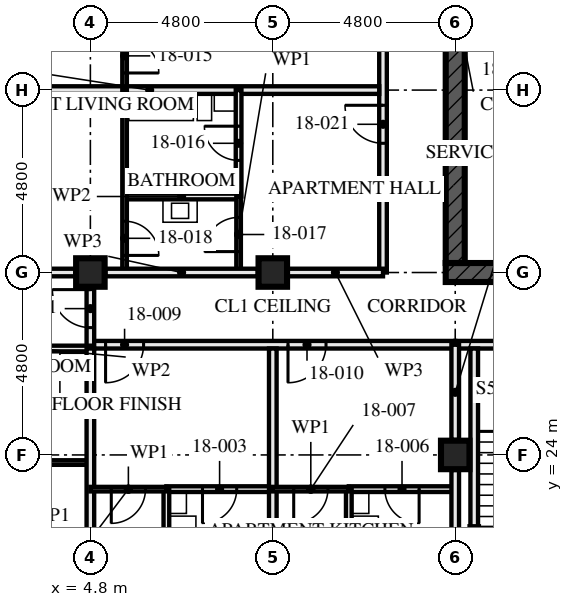
"""IFC4 building model, lengths in metres.
Left out: names, types, materials, properties, quantities, classifications, styles, units other than length and angle.
Written with IfcOpenShell. Run it as: python <this file> out.ifc"""

import sys

from ifc_helpers import new_model, si_unit, direction, frame, frame_2d, origin, origin_2d, place, context, subcontext, project, spatial, rectangle, hollow_rectangle, extrude, element, fill, save


model = new_model("IFC4")
c1 = context("Model", 3, precision=1e-05, world=origin(), true_north=direction((0.0, 1.0)))
c2 = subcontext(c1, "Body", "Model", "MODEL_VIEW")
j1 = project(units=[si_unit("LENGTHUNIT", "METRE"), si_unit("PLANEANGLEUNIT", "RADIAN")], contexts=[c1])
p1 = place(None, origin())
s1 = spatial("IfcSite", under=j1, at=p1, CompositionType="ELEMENT")
p2 = place(p1, origin())
s2 = spatial("IfcBuilding", under=s1, at=p2, CompositionType="ELEMENT")
p3 = place(p2, frame((0.0, 0.0, 69.0)))
s3 = spatial("IfcBuildingStorey", under=s2, at=p3, CompositionType="ELEMENT", Elevation=69.0)
for number, where, z_axis, x_axis in (
    (1, (4.8, 28.8, 0.0), (0.0, 0.0, 1.0), (0.0, 1.0, 0.0)),
    (2, (9.6, 28.8, 0.0), (0.0, 0.0, 1.0), (0.0, 1.0, 0.0)),
    (3, (14.4, 24.0, 0.0), (0.0, 0.0, 1.0), (1.0, 0.0, 0.0)),
):
    element("IfcColumn", number, at=place(p3, frame(where, z_axis=z_axis, x_axis=x_axis)), inside=s3, PredefinedType="COLUMN", context=c2, shape_type="SweptSolid", body=[
        extrude(hollow_rectangle(XDim=0.75, YDim=0.75, WallThickness=0.08, at=origin_2d()), origin(), (0.0, 0.0, 1.0), 3.5),
    ])
p4 = place(p3, frame((14.15, 28.8, -0.17), z_axis=(0.0, 0.0, 1.0), x_axis=(1.0, 0.0, 0.0)))
e4 = element("IfcWall", 4, at=p4, inside=s3, PredefinedType="SHEAR", context=c2, shape_type="SweptSolid", body=[
    extrude(rectangle(XDim=14.9, YDim=0.5, at=frame_2d((7.45, 0.0))), origin(), (0.0, 0.0, 1.0), 3.5),
])
p5 = place(p4, frame((6.85, 0.0, 0.17)))
e5 = element("IfcOpeningElement", 5, at=p5, cuts=e4, PredefinedType="OPENING", context=c2, shape_type="SweptSolid", body=[
    extrude(rectangle(XDim=1.2, YDim=2.1, at=frame_2d((0.6, 1.05))), frame((0.0, 0.26, 0.0), z_axis=(0.0, -1.0, 0.0), x_axis=(1.0, 0.0, 0.0)), (0.0, 0.0, 1.0), 0.521),
])
p6 = place(p3, frame((14.4, 42.95, -0.17), z_axis=(0.0, 0.0, 1.0), x_axis=(0.0, -1.0, 0.0)))
e6 = element("IfcWall", 6, at=p6, inside=s3, PredefinedType="SHEAR", context=c2, shape_type="SweptSolid", body=[
    extrude(rectangle(XDim=13.9, YDim=0.5, at=frame_2d((6.95, 0.0))), origin(), (0.0, 0.0, 1.0), 3.5),
])
p7 = place(p6, frame((6.35, 0.0, 0.17)))
e7 = element("IfcOpeningElement", 7, at=p7, cuts=e6, PredefinedType="OPENING", context=c2, shape_type="SweptSolid", body=[
    extrude(rectangle(XDim=1.2, YDim=2.1, at=frame_2d((0.6, 1.05))), frame((0.0, 0.26, 0.0), z_axis=(0.0, -1.0, 0.0), x_axis=(1.0, 0.0, 0.0)), (0.0, 0.0, 1.0), 0.521),
])
p8 = place(p3, frame((2.0, 26.8, 0.0), z_axis=(0.0, 0.0, 1.0), x_axis=(1.0, 0.0, 0.0)))
e8 = element("IfcWall", 8, at=p8, inside=s3, PredefinedType="PARTITIONING", context=c2, shape_type="SweptSolid", body=[
    extrude(rectangle(XDim=2.8, YDim=0.15, at=frame_2d((1.4, 0.0))), origin(), (0.0, 0.0, 1.0), 3.33),
])
p9 = place(p3, frame((0.32, 23.8, 0.0), z_axis=(0.0, 0.0, 1.0), x_axis=(1.0, 0.0, 0.0)))
e9 = element("IfcWall", 9, at=p9, inside=s3, PredefinedType="PARTITIONING", context=c2, shape_type="SweptSolid", body=[
    extrude(rectangle(XDim=4.48, YDim=0.12, at=frame_2d((2.24, 0.0))), origin(), (0.0, 0.0, 1.0), 3.33),
])
p10 = place(p9, frame((0.605, 0.0, 0.0)))
e10 = element("IfcOpeningElement", 10, at=p10, cuts=e9, PredefinedType="OPENING", context=c2, shape_type="SweptSolid", body=[
    extrude(rectangle(XDim=0.9, YDim=2.1, at=frame_2d((0.45, 1.05))), frame((0.0, 0.071, 0.0), z_axis=(0.0, -1.0, 0.0), x_axis=(1.0, 0.0, 0.0)), (0.0, 0.0, 1.0), 0.141),
])
p11 = place(p3, frame((4.8, 19.52, 0.0), z_axis=(0.0, 0.0, 1.0), x_axis=(0.0, 1.0, 0.0)))
e11 = element("IfcWall", 11, at=p11, inside=s3, PredefinedType="PARTITIONING", context=c2, shape_type="SweptSolid", body=[
    extrude(rectangle(XDim=7.28, YDim=0.2, at=frame_2d((3.64, 0.0))), origin(), (0.0, 0.0, 1.0), 2.55),
])
p12 = place(p3, frame((6.8, 20.1, 0.0), z_axis=(0.0, 0.0, 1.0), x_axis=(0.0, 1.0, 0.0)))
e12 = element("IfcWall", 12, at=p12, inside=s3, PredefinedType="PARTITIONING", context=c2, shape_type="SweptSolid", body=[
    extrude(rectangle(XDim=3.0, YDim=0.15, at=frame_2d((1.5, 0.0))), origin(), (0.0, 0.0, 1.0), 3.33),
])
p13 = place(p3, frame((6.8, 23.1, 0.0), z_axis=(0.0, 0.0, 1.0), x_axis=(1.0, 0.0, 0.0)))
e13 = element("IfcWall", 13, at=p13, inside=s3, PredefinedType="PARTITIONING", context=c2, shape_type="SweptSolid", body=[
    extrude(rectangle(XDim=2.8, YDim=0.15, at=frame_2d((1.4, 0.0))), origin(), (0.0, 0.0, 1.0), 3.33),
])
p14 = place(p13, frame((0.95, 0.0, 0.0)))
e14 = element("IfcOpeningElement", 14, at=p14, cuts=e13, PredefinedType="OPENING", context=c2, shape_type="SweptSolid", body=[
    extrude(rectangle(XDim=0.9, YDim=2.1, at=frame_2d((0.45, 1.05))), frame((0.0, 0.085, 0.0), z_axis=(0.0, -1.0, 0.0), x_axis=(1.0, 0.0, 0.0)), (0.0, 0.0, 1.0), 0.171),
])
p15 = place(p3, frame((4.8, 23.1, 0.0), z_axis=(0.0, 0.0, 1.0), x_axis=(1.0, 0.0, 0.0)))
e15 = element("IfcWall", 15, at=p15, inside=s3, PredefinedType="PARTITIONING", context=c2, shape_type="SweptSolid", body=[
    extrude(rectangle(XDim=2.0, YDim=0.12, at=frame_2d((1.0, 0.0))), origin(), (0.0, 0.0, 1.0), 3.33),
])
p16 = place(p15, frame((0.55, 0.0, 0.0)))
e16 = element("IfcOpeningElement", 16, at=p16, cuts=e15, PredefinedType="OPENING", context=c2, shape_type="SweptSolid", body=[
    extrude(rectangle(XDim=0.9, YDim=2.1, at=frame_2d((0.45, 1.05))), frame((0.0, 0.071, 0.0), z_axis=(0.0, -1.0, 0.0), x_axis=(1.0, 0.0, 0.0)), (0.0, 0.0, 1.0), 0.141),
])
p17 = place(p3, frame((9.6, 14.72, 0.0), z_axis=(0.0, 0.0, 1.0), x_axis=(0.0, 1.0, 0.0)))
e17 = element("IfcWall", 17, at=p17, inside=s3, PredefinedType="PARTITIONING", context=c2, shape_type="SweptSolid", body=[
    extrude(rectangle(XDim=12.08, YDim=0.2, at=frame_2d((6.04, 0.0))), origin(), (0.0, 0.0, 1.0), 2.55),
])
p18 = place(p3, frame((11.6, 20.1, 0.0), z_axis=(0.0, 0.0, 1.0), x_axis=(0.0, 1.0, 0.0)))
e18 = element("IfcWall", 18, at=p18, inside=s3, PredefinedType="PARTITIONING", context=c2, shape_type="SweptSolid", body=[
    extrude(rectangle(XDim=3.0, YDim=0.15, at=frame_2d((1.5, 0.0))), origin(), (0.0, 0.0, 1.0), 3.33),
])
p19 = place(p3, frame((11.6, 23.1, 0.0), z_axis=(0.0, 0.0, 1.0), x_axis=(1.0, 0.0, 0.0)))
e19 = element("IfcWall", 19, at=p19, inside=s3, PredefinedType="PARTITIONING", context=c2, shape_type="SweptSolid", body=[
    extrude(rectangle(XDim=2.8, YDim=0.15, at=frame_2d((1.4, 0.0))), origin(), (0.0, 0.0, 1.0), 3.33),
])
p20 = place(p19, frame((0.95, 0.0, 0.0)))
e20 = element("IfcOpeningElement", 20, at=p20, cuts=e19, PredefinedType="OPENING", context=c2, shape_type="SweptSolid", body=[
    extrude(rectangle(XDim=0.9, YDim=2.1, at=frame_2d((0.45, 1.05))), frame((0.0, 0.085, 0.0), z_axis=(0.0, -1.0, 0.0), x_axis=(1.0, 0.0, 0.0)), (0.0, 0.0, 1.0), 0.171),
])
p21 = place(p3, frame((9.6, 23.1, 0.0), z_axis=(0.0, 0.0, 1.0), x_axis=(1.0, 0.0, 0.0)))
e21 = element("IfcWall", 21, at=p21, inside=s3, PredefinedType="PARTITIONING", context=c2, shape_type="SweptSolid", body=[
    extrude(rectangle(XDim=2.0, YDim=0.12, at=frame_2d((1.0, 0.0))), origin(), (0.0, 0.0, 1.0), 3.33),
])
p22 = place(p21, frame((0.55, 0.0, 0.0)))
e22 = element("IfcOpeningElement", 22, at=p22, cuts=e21, PredefinedType="OPENING", context=c2, shape_type="SweptSolid", body=[
    extrude(rectangle(XDim=0.9, YDim=2.1, at=frame_2d((0.45, 1.05))), frame((0.0, 0.071, 0.0), z_axis=(0.0, -1.0, 0.0), x_axis=(1.0, 0.0, 0.0)), (0.0, 0.0, 1.0), 0.141),
])
p23 = place(p3, frame((4.8, 26.9, 0.0), z_axis=(0.0, 0.0, 1.0), x_axis=(1.0, 0.0, 0.0)))
e23 = element("IfcWall", 23, at=p23, inside=s3, PredefinedType="PARTITIONING", context=c2, shape_type="SweptSolid", body=[
    extrude(rectangle(XDim=9.6, YDim=0.2, at=frame_2d((4.8, 0.0))), origin(), (0.0, 0.0, 1.0), 3.33),
])
p24 = place(p23, frame((0.4, 0.0, 0.0)))
e24 = element("IfcOpeningElement", 24, at=p24, cuts=e23, PredefinedType="OPENING", context=c2, shape_type="SweptSolid", body=[
    extrude(rectangle(XDim=1.0, YDim=2.1, at=frame_2d((0.5, 1.05))), frame((0.0, 0.111, 0.0), z_axis=(0.0, -1.0, 0.0), x_axis=(1.0, 0.0, 0.0)), (0.0, 0.0, 1.0), 0.221),
])
p25 = place(p23, frame((5.2, 0.0, 0.0)))
e25 = element("IfcOpeningElement", 25, at=p25, cuts=e23, PredefinedType="OPENING", context=c2, shape_type="SweptSolid", body=[
    extrude(rectangle(XDim=1.0, YDim=2.1, at=frame_2d((0.5, 1.05))), frame((0.0, 0.111, 0.0), z_axis=(0.0, -1.0, 0.0), x_axis=(1.0, 0.0, 0.0)), (0.0, 0.0, 1.0), 0.221),
])
p26 = place(p3, frame((4.8, 26.8, 0.0), z_axis=(0.0, 0.0, 1.0), x_axis=(0.0, 1.0, 0.0)))
e26 = element("IfcWall", 26, at=p26, inside=s3, PredefinedType="PARTITIONING", context=c2, shape_type="SweptSolid", body=[
    extrude(rectangle(XDim=1.605, YDim=0.2, at=frame_2d((0.802, 0.0))), origin(), (0.0, 0.0, 1.0), 3.33),
])
p27 = place(p26, frame((0.55, 0.0, 0.0)))
e27 = element("IfcOpeningElement", 27, at=p27, cuts=e26, PredefinedType="OPENING", context=c2, shape_type="SweptSolid", body=[
    extrude(rectangle(XDim=1.0, YDim=2.1, at=frame_2d((0.5, 1.05))), frame((0.0, 0.111, 0.0), z_axis=(0.0, -1.0, 0.0), x_axis=(1.0, 0.0, 0.0)), (0.0, 0.0, 1.0), 0.221),
])
p28 = place(p3, frame((5.7, 38.4, 0.0), z_axis=(0.0, 0.0, 1.0), x_axis=(0.0, -1.0, 0.0)))
e28 = element("IfcWall", 28, at=p28, inside=s3, PredefinedType="PARTITIONING", context=c2, shape_type="SweptSolid", body=[
    extrude(rectangle(XDim=4.8, YDim=0.12, at=frame_2d((2.4, 0.0))), origin(), (0.0, 0.0, 1.0), 3.33),
])
p29 = place(p28, frame((3.45, 0.0, 0.0)))
e29 = element("IfcOpeningElement", 29, at=p29, cuts=e28, PredefinedType="OPENING", context=c2, shape_type="SweptSolid", body=[
    extrude(rectangle(XDim=0.9, YDim=2.1, at=frame_2d((0.45, 1.05))), frame((0.0, 0.071, 0.0), z_axis=(0.0, -1.0, 0.0), x_axis=(1.0, 0.0, 0.0)), (0.0, 0.0, 1.0), 0.141),
])
p30 = place(p3, frame((0.32, 33.6, 0.0), z_axis=(0.0, 0.0, 1.0), x_axis=(1.0, 0.0, 0.0)))
e30 = element("IfcWall", 30, at=p30, inside=s3, PredefinedType="PARTITIONING", context=c2, shape_type="SweptSolid", body=[
    extrude(rectangle(XDim=12.08, YDim=0.2, at=frame_2d((6.04, 0.0))), origin(), (0.0, 0.0, 1.0), 2.55),
])
p31 = place(p3, frame((5.7, 30.8, 0.0), z_axis=(0.0, 0.0, 1.0), x_axis=(1.0, 0.0, 0.0)))
e31 = element("IfcWall", 31, at=p31, inside=s3, PredefinedType="PARTITIONING", context=c2, shape_type="SweptSolid", body=[
    extrude(rectangle(XDim=3.0, YDim=0.15, at=frame_2d((1.5, 0.0))), origin(), (0.0, 0.0, 1.0), 3.33),
])
p32 = place(p3, frame((8.7, 33.6, 0.0), z_axis=(0.0, 0.0, 1.0), x_axis=(0.0, -1.0, 0.0)))
e32 = element("IfcWall", 32, at=p32, inside=s3, PredefinedType="PARTITIONING", context=c2, shape_type="SweptSolid", body=[
    extrude(rectangle(XDim=2.8, YDim=0.15, at=frame_2d((1.4, 0.0))), origin(), (0.0, 0.0, 1.0), 3.33),
])
p33 = place(p32, frame((0.95, 0.0, 0.0)))
e33 = element("IfcOpeningElement", 33, at=p33, cuts=e32, PredefinedType="OPENING", context=c2, shape_type="SweptSolid", body=[
    extrude(rectangle(XDim=0.9, YDim=2.1, at=frame_2d((0.45, 1.05))), frame((0.0, 0.085, 0.0), z_axis=(0.0, -1.0, 0.0), x_axis=(1.0, 0.0, 0.0)), (0.0, 0.0, 1.0), 0.171),
])
p34 = place(p3, frame((8.7, 30.8, 0.0), z_axis=(0.0, 0.0, 1.0), x_axis=(0.0, -1.0, 0.0)))
e34 = element("IfcWall", 34, at=p34, inside=s3, PredefinedType="PARTITIONING", context=c2, shape_type="SweptSolid", body=[
    extrude(rectangle(XDim=2.0, YDim=0.12, at=frame_2d((1.0, 0.0))), origin(), (0.0, 0.0, 1.0), 3.33),
])
p35 = place(p34, frame((0.55, 0.0, 0.0)))
e35 = element("IfcOpeningElement", 35, at=p35, cuts=e34, PredefinedType="OPENING", context=c2, shape_type="SweptSolid", body=[
    extrude(rectangle(XDim=0.9, YDim=2.1, at=frame_2d((0.45, 1.05))), frame((0.0, 0.071, 0.0), z_axis=(0.0, -1.0, 0.0), x_axis=(1.0, 0.0, 0.0)), (0.0, 0.0, 1.0), 0.141),
])
p36 = place(p3, frame((5.7, 33.6, 0.0), z_axis=(0.0, 0.0, 1.0), x_axis=(0.0, -1.0, 0.0)))
e36 = element("IfcWall", 36, at=p36, inside=s3, PredefinedType="PARTITIONING", context=c2, shape_type="SweptSolid", body=[
    extrude(rectangle(XDim=4.8, YDim=0.12, at=frame_2d((2.4, 0.0))), origin(), (0.0, 0.0, 1.0), 3.33),
])
p37 = place(p36, frame((3.45, 0.0, 0.0)))
e37 = element("IfcOpeningElement", 37, at=p37, cuts=e36, PredefinedType="OPENING", context=c2, shape_type="SweptSolid", body=[
    extrude(rectangle(XDim=0.9, YDim=2.1, at=frame_2d((0.45, 1.05))), frame((0.0, 0.071, 0.0), z_axis=(0.0, -1.0, 0.0), x_axis=(1.0, 0.0, 0.0)), (0.0, 0.0, 1.0), 0.141),
])
p38 = place(p3, frame((12.5, 43.2, 0.0), z_axis=(0.0, 0.0, 1.0), x_axis=(0.0, -1.0, 0.0)))
e38 = element("IfcWall", 38, at=p38, inside=s3, PredefinedType="PARTITIONING", context=c2, shape_type="SweptSolid", body=[
    extrude(rectangle(XDim=14.4, YDim=0.2, at=frame_2d((7.2, 0.0))), origin(), (0.0, 0.0, 1.0), 2.55),
])
p39 = place(p38, frame((1.4, 0.0, 0.0)))
e39 = element("IfcOpeningElement", 39, at=p39, cuts=e38, PredefinedType="OPENING", context=c2, shape_type="SweptSolid", body=[
    extrude(rectangle(XDim=1.0, YDim=2.1, at=frame_2d((0.5, 1.05))), frame((0.0, 0.111, 0.0), z_axis=(0.0, -1.0, 0.0), x_axis=(1.0, 0.0, 0.0)), (0.0, 0.0, 1.0), 0.221),
])
p40 = place(p38, frame((5.2, 0.0, 0.0)))
e40 = element("IfcOpeningElement", 40, at=p40, cuts=e38, PredefinedType="OPENING", context=c2, shape_type="SweptSolid", body=[
    extrude(rectangle(XDim=1.0, YDim=2.1, at=frame_2d((0.5, 1.05))), frame((0.0, 0.111, 0.0), z_axis=(0.0, -1.0, 0.0), x_axis=(1.0, 0.0, 0.0)), (0.0, 0.0, 1.0), 0.221),
])
p41 = place(p38, frame((10.0, 0.0, 0.0)))
e41 = element("IfcOpeningElement", 41, at=p41, cuts=e38, PredefinedType="OPENING", context=c2, shape_type="SweptSolid", body=[
    extrude(rectangle(XDim=1.0, YDim=2.1, at=frame_2d((0.5, 1.05))), frame((0.0, 0.111, 0.0), z_axis=(0.0, -1.0, 0.0), x_axis=(1.0, 0.0, 0.0)), (0.0, 0.0, 1.0), 0.221),
])
p42 = place(p3, frame((14.9, 22.1, 0.0), z_axis=(0.0, 0.0, 1.0), x_axis=(0.0, 1.0, 0.0)))
e42 = element("IfcWall", 42, at=p42, inside=s3, PredefinedType="SOLIDWALL", context=c2, shape_type="SweptSolid", body=[
    extrude(rectangle(XDim=4.7, YDim=0.2, at=frame_2d((2.35, 0.0))), origin(), (0.0, 0.0, 1.0), 2.99),
])
p43 = place(p3, frame((14.4, 26.9, 0.0), z_axis=(0.0, 0.0, 1.0), x_axis=(1.0, 0.0, 0.0)))
e43 = element("IfcWall", 43, at=p43, inside=s3, PredefinedType="PARTITIONING", context=c2, shape_type="SweptSolid", body=[
    extrude(rectangle(XDim=14.4, YDim=0.2, at=frame_2d((7.2, 0.0))), origin(), (0.0, 0.0, 1.0), 2.55),
])
p44 = place(p43, frame((1.4, 0.0, 0.0)))
e44 = element("IfcOpeningElement", 44, at=p44, cuts=e43, PredefinedType="OPENING", context=c2, shape_type="SweptSolid", body=[
    extrude(rectangle(XDim=1.0, YDim=2.1, at=frame_2d((0.5, 1.05))), frame((0.0, 0.111, 0.0), z_axis=(0.0, -1.0, 0.0), x_axis=(1.0, 0.0, 0.0)), (0.0, 0.0, 1.0), 0.221),
])
p45 = place(p43, frame((3.65, 0.0, 0.0)))
e45 = element("IfcOpeningElement", 45, at=p45, cuts=e43, PredefinedType="OPENING", context=c2, shape_type="SweptSolid", body=[
    extrude(rectangle(XDim=0.9, YDim=2.1, at=frame_2d((0.45, 1.05))), frame((0.0, 0.111, 0.0), z_axis=(0.0, -1.0, 0.0), x_axis=(1.0, 0.0, 0.0)), (0.0, 0.0, 1.0), 0.221),
])
p46 = place(p43, frame((5.2, 0.0, 0.0)))
e46 = element("IfcOpeningElement", 46, at=p46, cuts=e43, PredefinedType="OPENING", context=c2, shape_type="SweptSolid", body=[
    extrude(rectangle(XDim=1.0, YDim=2.1, at=frame_2d((0.5, 1.05))), frame((0.0, 0.111, 0.0), z_axis=(0.0, -1.0, 0.0), x_axis=(1.0, 0.0, 0.0)), (0.0, 0.0, 1.0), 0.221),
])
p47 = place(p43, frame((10.0, 0.0, 0.0)))
e47 = element("IfcOpeningElement", 47, at=p47, cuts=e43, PredefinedType="OPENING", context=c2, shape_type="SweptSolid", body=[
    extrude(rectangle(XDim=1.0, YDim=2.1, at=frame_2d((0.5, 1.05))), frame((0.0, 0.111, 0.0), z_axis=(0.0, -1.0, 0.0), x_axis=(1.0, 0.0, 0.0)), (0.0, 0.0, 1.0), 0.221),
])
p48 = place(p3, frame((12.5, 28.8, 0.0), z_axis=(0.0, 0.0, 1.0), x_axis=(-1.0, 0.0, 0.0)))
e48 = element("IfcWall", 48, at=p48, inside=s3, PredefinedType="PARTITIONING", context=c2, shape_type="SweptSolid", body=[
    extrude(rectangle(XDim=2.505, YDim=0.2, at=frame_2d((1.252, 0.0))), origin(), (0.0, 0.0, 1.0), 2.32),
])
p49 = place(p3, frame((9.205, 28.8, 0.0), z_axis=(0.0, 0.0, 1.0), x_axis=(-1.0, 0.0, 0.0)))
e49 = element("IfcWall", 49, at=p49, inside=s3, PredefinedType="PARTITIONING", context=c2, shape_type="SweptSolid", body=[
    extrude(rectangle(XDim=4.01, YDim=0.2, at=frame_2d((2.005, 0.0))), origin(), (0.0, 0.0, 1.0), 2.32),
])
p50 = place(p3, frame((4.405, 28.8, 0.0), z_axis=(0.0, 0.0, 1.0), x_axis=(-1.0, 0.0, 0.0)))
e50 = element("IfcWall", 50, at=p50, inside=s3, PredefinedType="PARTITIONING", context=c2, shape_type="SweptSolid", body=[
    extrude(rectangle(XDim=4.085, YDim=0.2, at=frame_2d((2.042, 0.0))), origin(), (0.0, 0.0, 1.0), 2.32),
])
p51 = place(p3, frame((14.4, 19.595, 0.0), z_axis=(0.0, 0.0, 1.0), x_axis=(0.0, 1.0, 0.0)))
e51 = element("IfcWall", 51, at=p51, inside=s3, PredefinedType="PARTITIONING", context=c2, shape_type="SweptSolid", body=[
    extrude(rectangle(XDim=4.01, YDim=0.2, at=frame_2d((2.005, 0.0))), origin(), (0.0, 0.0, 1.0), 2.32),
])
p52 = place(p3, frame((14.4, 24.395, 0.0), z_axis=(0.0, 0.0, 1.0), x_axis=(0.0, 1.0, 0.0)))
e52 = element("IfcWall", 52, at=p52, inside=s3, PredefinedType="PARTITIONING", context=c2, shape_type="SweptSolid", body=[
    extrude(rectangle(XDim=2.505, YDim=0.2, at=frame_2d((1.252, 0.0))), origin(), (0.0, 0.0, 1.0), 2.32),
])
p53 = place(p14, frame((0.9, 0.0, 0.0), z_axis=(0.0, 0.0, 1.0), x_axis=(-1.0, 0.0, 0.0)))
e53 = element("IfcDoor", 53, at=p53, inside=s3, OperationType="SINGLE_SWING_LEFT", PredefinedType="DOOR", context=c2, shape_type="SweptSolid", body=[
    extrude(rectangle(XDim=0.9, YDim=2.1, at=frame_2d((0.45, 1.05))), frame((0.0, 0.022, 0.0), z_axis=(0.0, -1.0, 0.0), x_axis=(1.0, 0.0, 0.0)), (0.0, 0.0, 1.0), 0.044),
])
fill(e14, e53)
p54 = place(p16, frame((0.9, 0.0, 0.0), z_axis=(0.0, 0.0, 1.0), x_axis=(-1.0, 0.0, 0.0)))
e54 = element("IfcDoor", 54, at=p54, inside=s3, OperationType="SINGLE_SWING_LEFT", PredefinedType="DOOR", context=c2, shape_type="SweptSolid", body=[
    extrude(rectangle(XDim=0.9, YDim=2.1, at=frame_2d((0.45, 1.05))), frame((0.0, 0.022, 0.0), z_axis=(0.0, -1.0, 0.0), x_axis=(1.0, 0.0, 0.0)), (0.0, 0.0, 1.0), 0.044),
])
fill(e16, e54)
p55 = place(p20, frame((0.9, 0.0, 0.0), z_axis=(0.0, 0.0, 1.0), x_axis=(-1.0, 0.0, 0.0)))
e55 = element("IfcDoor", 55, at=p55, inside=s3, OperationType="SINGLE_SWING_RIGHT", PredefinedType="DOOR", context=c2, shape_type="SweptSolid", body=[
    extrude(rectangle(XDim=0.9, YDim=2.1, at=frame_2d((0.45, 1.05))), frame((0.0, 0.022, 0.0), z_axis=(0.0, -1.0, 0.0), x_axis=(1.0, 0.0, 0.0)), (0.0, 0.0, 1.0), 0.044),
])
fill(e20, e55)
p56 = place(p22, frame((0.9, 0.0, 0.0), z_axis=(0.0, 0.0, 1.0), x_axis=(-1.0, 0.0, 0.0)))
e56 = element("IfcDoor", 56, at=p56, inside=s3, OperationType="SINGLE_SWING_LEFT", PredefinedType="DOOR", context=c2, shape_type="SweptSolid", body=[
    extrude(rectangle(XDim=0.9, YDim=2.1, at=frame_2d((0.45, 1.05))), frame((0.0, 0.022, 0.0), z_axis=(0.0, -1.0, 0.0), x_axis=(1.0, 0.0, 0.0)), (0.0, 0.0, 1.0), 0.044),
])
fill(e22, e56)
p57 = place(p24, frame((1.0, 0.0, 0.0), z_axis=(0.0, 0.0, 1.0), x_axis=(-1.0, 0.0, 0.0)))
e57 = element("IfcDoor", 57, at=p57, inside=s3, OperationType="SINGLE_SWING_LEFT", PredefinedType="DOOR", context=c2, shape_type="SweptSolid", body=[
    extrude(rectangle(XDim=1.0, YDim=2.1, at=frame_2d((0.5, 1.05))), frame((0.0, 0.027, 0.0), z_axis=(0.0, -1.0, 0.0), x_axis=(1.0, 0.0, 0.0)), (0.0, 0.0, 1.0), 0.054),
])
fill(e24, e57)
p58 = place(p25, frame((1.0, 0.0, 0.0), z_axis=(0.0, 0.0, 1.0), x_axis=(-1.0, 0.0, 0.0)))
e58 = element("IfcDoor", 58, at=p58, inside=s3, OperationType="SINGLE_SWING_LEFT", PredefinedType="DOOR", context=c2, shape_type="SweptSolid", body=[
    extrude(rectangle(XDim=1.0, YDim=2.1, at=frame_2d((0.5, 1.05))), frame((0.0, 0.027, 0.0), z_axis=(0.0, -1.0, 0.0), x_axis=(1.0, 0.0, 0.0)), (0.0, 0.0, 1.0), 0.054),
])
fill(e25, e58)
p59 = place(p27, origin())
e59 = element("IfcDoor", 59, at=p59, inside=s3, OperationType="SINGLE_SWING_LEFT", PredefinedType="DOOR", context=c2, shape_type="SweptSolid", body=[
    extrude(rectangle(XDim=1.0, YDim=2.1, at=frame_2d((0.5, 1.05))), frame((0.0, 0.027, 0.0), z_axis=(0.0, -1.0, 0.0), x_axis=(1.0, 0.0, 0.0)), (0.0, 0.0, 1.0), 0.054),
])
fill(e27, e59)
p60 = place(p29, origin())
e60 = element("IfcDoor", 60, at=p60, inside=s3, OperationType="SINGLE_SWING_LEFT", PredefinedType="DOOR", context=c2, shape_type="SweptSolid", body=[
    extrude(rectangle(XDim=0.9, YDim=2.1, at=frame_2d((0.45, 1.05))), frame((0.0, 0.022, 0.0), z_axis=(0.0, -1.0, 0.0), x_axis=(1.0, 0.0, 0.0)), (0.0, 0.0, 1.0), 0.044),
])
fill(e29, e60)
p61 = place(p33, frame((0.9, 0.0, 0.0), z_axis=(0.0, 0.0, 1.0), x_axis=(-1.0, 0.0, 0.0)))
e61 = element("IfcDoor", 61, at=p61, inside=s3, OperationType="SINGLE_SWING_LEFT", PredefinedType="DOOR", context=c2, shape_type="SweptSolid", body=[
    extrude(rectangle(XDim=0.9, YDim=2.1, at=frame_2d((0.45, 1.05))), frame((0.0, 0.022, 0.0), z_axis=(0.0, -1.0, 0.0), x_axis=(1.0, 0.0, 0.0)), (0.0, 0.0, 1.0), 0.044),
])
fill(e33, e61)
p62 = place(p35, frame((0.9, 0.0, 0.0), z_axis=(0.0, 0.0, 1.0), x_axis=(-1.0, 0.0, 0.0)))
e62 = element("IfcDoor", 62, at=p62, inside=s3, OperationType="SINGLE_SWING_RIGHT", PredefinedType="DOOR", context=c2, shape_type="SweptSolid", body=[
    extrude(rectangle(XDim=0.9, YDim=2.1, at=frame_2d((0.45, 1.05))), frame((0.0, 0.022, 0.0), z_axis=(0.0, -1.0, 0.0), x_axis=(1.0, 0.0, 0.0)), (0.0, 0.0, 1.0), 0.044),
])
fill(e35, e62)
p63 = place(p37, origin())
e63 = element("IfcDoor", 63, at=p63, inside=s3, OperationType="SINGLE_SWING_LEFT", PredefinedType="DOOR", context=c2, shape_type="SweptSolid", body=[
    extrude(rectangle(XDim=0.9, YDim=2.1, at=frame_2d((0.45, 1.05))), frame((0.0, 0.022, 0.0), z_axis=(0.0, -1.0, 0.0), x_axis=(1.0, 0.0, 0.0)), (0.0, 0.0, 1.0), 0.044),
])
fill(e37, e63)
p64 = place(p41, frame((1.0, 0.0, 0.0), z_axis=(0.0, 0.0, 1.0), x_axis=(-1.0, 0.0, 0.0)))
e64 = element("IfcDoor", 64, at=p64, inside=s3, OperationType="SINGLE_SWING_LEFT", PredefinedType="DOOR", context=c2, shape_type="SweptSolid", body=[
    extrude(rectangle(XDim=1.0, YDim=2.1, at=frame_2d((0.5, 1.05))), frame((0.0, 0.027, 0.0), z_axis=(0.0, -1.0, 0.0), x_axis=(1.0, 0.0, 0.0)), (0.0, 0.0, 1.0), 0.054),
])
fill(e41, e64)
save(model, sys.argv[1])
